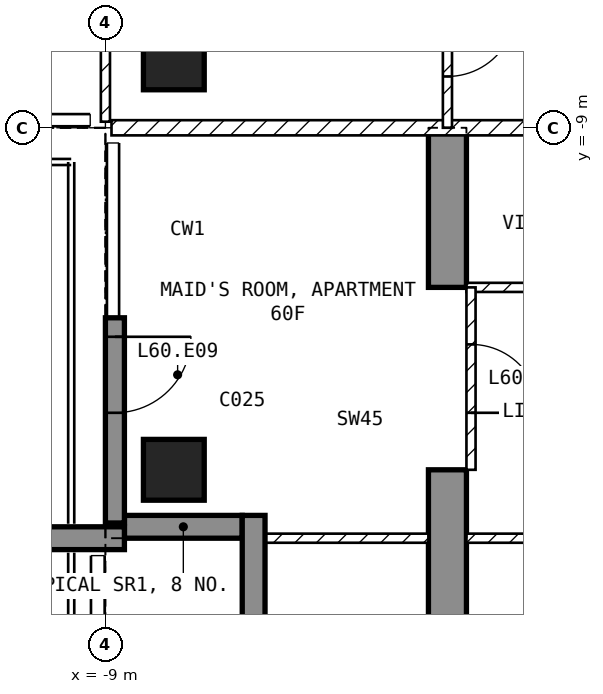
"""IFC4 building model, lengths in metres.
Left out: names, types, materials, properties, quantities, classifications, styles, units other than length and angle.
Written with IfcOpenShell. Run it as: python <this file> out.ifc"""

import sys

from ifc_helpers import new_model, si_unit, direction, frame, frame_2d, origin, origin_2d, place, context, subcontext, project, spatial, polyline, rectangle, outline, extrude, element, fill, save


model = new_model("IFC4")
c1 = context("Model", 3, precision=1e-05, world=origin(), true_north=direction((0.0, 1.0)))
c2 = subcontext(c1, "Body", "Model", "MODEL_VIEW")
j1 = project(units=[si_unit("LENGTHUNIT", "METRE"), si_unit("PLANEANGLEUNIT", "RADIAN")], contexts=[c1])
p1 = place(None, origin())
s1 = spatial("IfcSite", under=j1, at=p1, CompositionType="ELEMENT")
p2 = place(p1, origin())
s2 = spatial("IfcBuilding", under=s1, at=p2, CompositionType="ELEMENT")
p3 = place(p2, frame((0.0, 0.0, 239.5)))
s3 = spatial("IfcBuildingStorey", under=s2, at=p3, CompositionType="ELEMENT", Elevation=239.5)
for number, where, z_axis, x_axis in (
    (1, (-8.1, -13.5, -0.25), (0.0, 0.0, 1.0), (1.0, 0.0, 0.0)),
    (2, (-8.1, -8.1, -0.25), (0.0, 0.0, 1.0), (1.0, 0.0, 0.0)),
):
    element("IfcColumn", number, at=place(p3, frame(where, z_axis=z_axis, x_axis=x_axis)), inside=s3, PredefinedType="COLUMN", context=c2, shape_type="SweptSolid", body=[
        extrude(rectangle(XDim=0.8, YDim=0.8, at=origin_2d()), origin(), (0.0, 0.0, 1.0), 3.5),
    ])
p4 = place(p3, frame((-4.75, -16.7, -0.25), z_axis=(1.0, 0.0, 0.0), x_axis=(0.0, 1.0, 0.0)))
e3 = element("IfcWall", 3, at=p4, inside=s3, PredefinedType="SHEAR", context=c2, shape_type="SweptSolid", body=[
    extrude(outline(polyline([(0.0, 0.0), (3.2, 0.0), (3.2, 2.65), (5.6, 2.65), (5.6, 0.0), (7.7, 0.0), (7.7, 3.5), (0.0, 3.5), (0.0, 0.0)])), origin(), (0.0, 0.0, 1.0), 0.5),
])
p5 = place(p3, frame((-8.875, -11.5, 0.0), z_axis=(0.0, 0.0, 1.0), x_axis=(0.0, -1.0, 0.0)))
e4 = element("IfcWall", 4, at=p5, inside=s3, PredefinedType="SOLIDWALL", context=c2, shape_type="SweptSolid", body=[
    extrude(rectangle(XDim=2.7, YDim=0.25, at=frame_2d((1.35, 0.0))), origin(), (0.0, 0.0, 1.0), 3.25),
])
p6 = place(p5, frame((0.25, 0.0, 0.0)))
e5 = element("IfcOpeningElement", 5, at=p6, cuts=e4, PredefinedType="OPENING", context=c2, shape_type="SweptSolid", body=[
    extrude(rectangle(XDim=1.0, YDim=2.4, at=frame_2d((0.5, 1.2))), frame((0.0, 0.135, 0.0), z_axis=(0.0, -1.0, 0.0), x_axis=(1.0, 0.0, 0.0)), (0.0, 0.0, 1.0), 0.27),
])
p7 = place(p3, frame((-8.75, -14.25, 0.0), z_axis=(0.0, 0.0, 1.0), x_axis=(1.0, 0.0, 0.0)))
e6 = element("IfcWall", 6, at=p7, inside=s3, PredefinedType="SOLIDWALL", context=c2, shape_type="SweptSolid", body=[
    extrude(rectangle(XDim=1.55, YDim=0.3, at=frame_2d((0.775, 0.0))), origin(), (0.0, 0.0, 1.0), 3.25),
])
p8 = place(p3, frame((-7.05, -14.1, 0.0), z_axis=(0.0, 0.0, 1.0), x_axis=(0.0, -1.0, 0.0)))
e7 = element("IfcWall", 7, at=p8, inside=s3, PredefinedType="SOLIDWALL", context=c2, shape_type="SweptSolid", body=[
    extrude(rectangle(XDim=1.8, YDim=0.3, at=frame_2d((0.9, 0.0))), origin(), (0.0, 0.0, 1.0), 3.25),
])
p9 = place(p3, frame((-8.75, -14.4, 0.0), z_axis=(0.0, 0.0, 1.0), x_axis=(-1.0, 0.0, 0.0)))
e8 = element("IfcWall", 8, at=p9, inside=s3, PredefinedType="SOLIDWALL", context=c2, shape_type="SweptSolid", body=[
    extrude(rectangle(XDim=2.95, YDim=0.3, at=frame_2d((1.475, 0.0))), origin(), (0.0, 0.0, 1.0), 3.25),
])
p10 = place(p3, frame((8.92, -9.0, 0.0), z_axis=(0.0, 0.0, 1.0), x_axis=(-1.0, 0.0, 0.0)))
e9 = element("IfcWall", 9, at=p10, inside=s3, PredefinedType="PARTITIONING", context=c2, shape_type="SweptSolid", body=[
    extrude(rectangle(XDim=17.84, YDim=0.2, at=frame_2d((8.92, 0.0))), origin(), (0.0, 0.0, 1.0), 3.25),
])
p11 = place(p10, frame((8.42, 0.0, 0.0)))
e10 = element("IfcOpeningElement", 10, at=p11, cuts=e9, PredefinedType="OPENING", context=c2, shape_type="SweptSolid", body=[
    extrude(rectangle(XDim=1.0, YDim=2.1, at=frame_2d((0.5, 1.05))), frame((0.0, 0.11, 0.0), z_axis=(0.0, -1.0, 0.0), x_axis=(1.0, 0.0, 0.0)), (0.0, 0.0, 1.0), 0.22),
])
p12 = place(p3, frame((-9.0, -1.3, 0.0), z_axis=(0.0, 0.0, 1.0), x_axis=(0.0, -1.0, 0.0)))
e11 = element("IfcWall", 11, at=p12, inside=s3, PredefinedType="PARTITIONING", context=c2, shape_type="SweptSolid", body=[
    extrude(rectangle(XDim=7.62, YDim=0.12, at=frame_2d((3.81, 0.0))), origin(), (0.0, 0.0, 1.0), 3.25),
])
p13 = place(p12, frame((0.85, 0.0, 0.0)))
e12 = element("IfcOpeningElement", 12, at=p13, cuts=e11, PredefinedType="OPENING", context=c2, shape_type="SweptSolid", body=[
    extrude(rectangle(XDim=0.9, YDim=2.1, at=frame_2d((0.45, 1.05))), frame((0.0, 0.07, 0.0), z_axis=(0.0, -1.0, 0.0), x_axis=(1.0, 0.0, 0.0)), (0.0, 0.0, 1.0), 0.14),
])
p14 = place(p3, frame((-4.5, -6.75, 0.0), z_axis=(0.0, 0.0, 1.0), x_axis=(0.0, -1.0, 0.0)))
e13 = element("IfcWall", 13, at=p14, inside=s3, PredefinedType="PARTITIONING", context=c2, shape_type="SweptSolid", body=[
    extrude(rectangle(XDim=2.25, YDim=0.12, at=frame_2d((1.125, 0.0))), origin(), (0.0, 0.0, 1.0), 3.25),
])
p15 = place(p14, frame((0.675, 0.0, 0.0)))
e14 = element("IfcOpeningElement", 14, at=p15, cuts=e13, PredefinedType="OPENING", context=c2, shape_type="SweptSolid", body=[
    extrude(rectangle(XDim=0.9, YDim=2.1, at=frame_2d((0.45, 1.05))), frame((0.0, 0.07, 0.0), z_axis=(0.0, -1.0, 0.0), x_axis=(1.0, 0.0, 0.0)), (0.0, 0.0, 1.0), 0.14),
])
p16 = place(p3, frame((2.1, -11.1, 0.0), z_axis=(0.0, 0.0, 1.0), x_axis=(-1.0, 0.0, 0.0)))
e15 = element("IfcWall", 15, at=p16, inside=s3, PredefinedType="PARTITIONING", context=c2, shape_type="SweptSolid", body=[
    extrude(rectangle(XDim=6.35, YDim=0.12, at=frame_2d((3.175, 0.0))), origin(), (0.0, 0.0, 1.0), 3.25),
])
p17 = place(p16, frame((2.725, 0.0, 0.0)))
e16 = element("IfcOpeningElement", 16, at=p17, cuts=e15, PredefinedType="OPENING", context=c2, shape_type="SweptSolid", body=[
    extrude(rectangle(XDim=0.9, YDim=2.1, at=frame_2d((0.45, 1.05))), frame((0.0, 0.07, 0.0), z_axis=(0.0, -1.0, 0.0), x_axis=(1.0, 0.0, 0.0)), (0.0, 0.0, 1.0), 0.14),
])
p18 = place(p3, frame((4.25, -14.4, 0.0), z_axis=(0.0, 0.0, 1.0), x_axis=(-1.0, 0.0, 0.0)))
e17 = element("IfcWall", 17, at=p18, inside=s3, PredefinedType="PARTITIONING", context=c2, shape_type="SweptSolid", body=[
    extrude(rectangle(XDim=8.5, YDim=0.12, at=frame_2d((4.25, 0.0))), origin(), (0.0, 0.0, 1.0), 3.25),
])
p19 = place(p18, frame((5.675, 0.0, 0.0)))
e18 = element("IfcOpeningElement", 18, at=p19, cuts=e17, PredefinedType="OPENING", context=c2, shape_type="SweptSolid", body=[
    extrude(rectangle(XDim=0.9, YDim=2.1, at=frame_2d((0.45, 1.05))), frame((0.0, 0.07, 0.0), z_axis=(0.0, -1.0, 0.0), x_axis=(1.0, 0.0, 0.0)), (0.0, 0.0, 1.0), 0.14),
])
p20 = place(p3, frame((-4.75, -14.4, 0.0), z_axis=(0.0, 0.0, 1.0), x_axis=(-1.0, 0.0, 0.0)))
e19 = element("IfcWall", 19, at=p20, inside=s3, PredefinedType="PARTITIONING", context=c2, shape_type="SweptSolid", body=[
    extrude(rectangle(XDim=2.37, YDim=0.12, at=frame_2d((1.185, 0.0))), origin(), (0.0, 0.0, 1.0), 3.25),
])
p21 = place(p3, frame((-4.19, -11.1, 0.0), z_axis=(0.0, 0.0, 1.0), x_axis=(0.0, -1.0, 0.0)))
e20 = element("IfcWall", 20, at=p21, inside=s3, PredefinedType="PARTITIONING", context=c2, shape_type="SweptSolid", body=[
    extrude(rectangle(XDim=2.4, YDim=0.12, at=frame_2d((1.2, 0.0))), origin(), (0.0, 0.0, 1.0), 2.4),
])
p22 = place(p21, frame((0.75, 0.0, 0.0)))
e21 = element("IfcOpeningElement", 21, at=p22, cuts=e20, PredefinedType="OPENING", context=c2, shape_type="SweptSolid", body=[
    extrude(rectangle(XDim=0.9, YDim=2.1, at=frame_2d((0.45, 1.05))), frame((0.0, 0.07, 0.0), z_axis=(0.0, -1.0, 0.0), x_axis=(1.0, 0.0, 0.0)), (0.0, 0.0, 1.0), 0.14),
])
p23 = place(p6, origin())
e22 = element("IfcDoor", 22, at=p23, inside=s3, OperationType="SINGLE_SWING_LEFT", PredefinedType="DOOR", context=c2, shape_type="SweptSolid", body=[
    extrude(rectangle(XDim=1.0, YDim=2.4, at=frame_2d((0.5, 1.2))), frame((0.0, 0.025, 0.0), z_axis=(0.0, -1.0, 0.0), x_axis=(1.0, 0.0, 0.0)), (0.0, 0.0, 1.0), 0.05),
])
fill(e5, e22)
p24 = place(p15, origin())
e23 = element("IfcDoor", 23, at=p24, inside=s3, OperationType="SINGLE_SWING_LEFT", PredefinedType="DOOR", context=c2, shape_type="SweptSolid", body=[
    extrude(rectangle(XDim=0.9, YDim=2.1, at=frame_2d((0.45, 1.05))), frame((0.0, 0.025, 0.0), z_axis=(0.0, -1.0, 0.0), x_axis=(1.0, 0.0, 0.0)), (0.0, 0.0, 1.0), 0.05),
])
fill(e14, e23)
p25 = place(p22, origin())
e24 = element("IfcDoor", 24, at=p25, inside=s3, OperationType="SINGLE_SWING_RIGHT", PredefinedType="DOOR", context=c2, shape_type="SweptSolid", body=[
    extrude(rectangle(XDim=0.9, YDim=2.1, at=frame_2d((0.45, 1.05))), frame((0.0, 0.025, 0.0), z_axis=(0.0, -1.0, 0.0), x_axis=(1.0, 0.0, 0.0)), (0.0, 0.0, 1.0), 0.05),
])
fill(e21, e24)
save(model, sys.argv[1])
